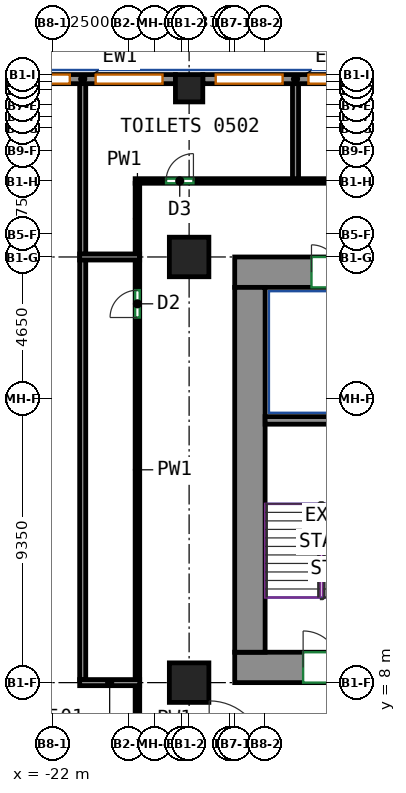
"""IFC4 building model, lengths in metres.
Left out: names, types, materials, properties, quantities, classifications, styles, units other than length and angle.
Written with IfcOpenShell. Run it as: python <this file> out.ifc"""

import sys

from ifc_helpers import new_model, si_unit, direction, frame, frame_2d, origin, origin_2d, place, context, subcontext, project, spatial, rectangle, extrude, source, transform, mapped, element, fill, save


model = new_model("IFC4")
c1 = context("Model", 3, precision=1e-05, world=origin(), true_north=direction((0.0, 1.0)))
c2 = subcontext(c1, "Body", "Model", "MODEL_VIEW")
j1 = project(units=[si_unit("LENGTHUNIT", "METRE"), si_unit("PLANEANGLEUNIT", "RADIAN")], contexts=[c1])
p1 = place(None, origin())
s1 = spatial("IfcSite", under=j1, at=p1, CompositionType="ELEMENT")
p2 = place(p1, origin())
s2 = spatial("IfcBuilding", under=s1, at=p2, CompositionType="ELEMENT")
p3 = place(p2, frame((0.0, 0.0, 27.0)))
s3 = spatial("IfcBuildingStorey", under=s2, at=p3, CompositionType="ELEMENT", Elevation=27.0)
m1 = source(origin(), c2, "Body", "SweptSolid", [
    extrude(rectangle(XDim=1.3, YDim=1.3, at=origin_2d()), origin(), (0.0, 0.0, 1.0), 3.72),
])
for number, where, z_axis, x_axis in (
    (1, (-17.5, 8.0, 0.0), (0.0, 0.0, 1.0), (1.0, 0.0, 0.0)),
    (2, (-17.5, 22.0, 0.0), (0.0, 0.0, 1.0), (1.0, 0.0, 0.0)),
):
    element("IfcColumn", number, at=place(p3, frame(where, z_axis=z_axis, x_axis=x_axis)), inside=s3, PredefinedType="COLUMN", context=c2, shape_type="MappedRepresentation", body=[
        mapped(m1, transform((0.0, 0.0, 0.0))),
    ])
m2 = source(origin(), c2, "Body", "SweptSolid", [
    extrude(rectangle(XDim=0.9, YDim=0.9, at=origin_2d()), origin(), (0.0, 0.0, 1.0), 3.72),
])
p4 = place(p3, frame((-17.5, 27.55, 0.0), z_axis=(0.0, 0.0, 1.0), x_axis=(1.0, 0.0, 0.0)))
e3 = element("IfcColumn", 3, at=p4, inside=s3, PredefinedType="COLUMN", context=c2, shape_type="MappedRepresentation", body=[
    mapped(m2, transform((0.0, 0.0, 0.0))),
])
m3 = source(origin(), c2, "Body", "SweptSolid", [
    extrude(rectangle(XDim=5.63, YDim=1.0, at=frame_2d((2.815, 0.0))), origin(), (0.0, 0.0, 1.0), 3.72),
])
p5 = place(p3, frame((-16.0, 8.5, 0.0), z_axis=(0.0, 0.0, 1.0), x_axis=(1.0, 0.0, 0.0)))
e4 = element("IfcWall", 4, at=p5, inside=s3, PredefinedType="SHEAR", context=c2, shape_type="MappedRepresentation", body=[
    mapped(m3, transform((0.0, 0.0, 0.0))),
])
p6 = place(p5, frame((2.25, 0.0, 0.0)))
e5 = element("IfcOpeningElement", 5, at=p6, cuts=e4, PredefinedType="OPENING", context=c2, shape_type="SweptSolid", body=[
    extrude(rectangle(XDim=1.2, YDim=2.1, at=frame_2d((0.6, 1.05))), frame((0.0, 0.51, 0.0), z_axis=(0.0, -1.0, 0.0), x_axis=(1.0, 0.0, 0.0)), (0.0, 0.0, 1.0), 1.02),
])
m4 = source(origin(), c2, "Body", "SweptSolid", [
    extrude(rectangle(XDim=34.1, YDim=1.0, at=frame_2d((17.05, 0.0))), origin(), (0.0, 0.0, 1.0), 3.72),
])
p7 = place(p3, frame((-16.0, 21.5, 0.0), z_axis=(0.0, 0.0, 1.0), x_axis=(1.0, 0.0, 0.0)))
e6 = element("IfcWall", 6, at=p7, inside=s3, PredefinedType="SHEAR", context=c2, shape_type="MappedRepresentation", body=[
    mapped(m4, transform((0.0, 0.0, 0.0))),
])
p8 = place(p7, frame((6.108, 0.0, 0.0)))
e7 = element("IfcOpeningElement", 7, at=p8, cuts=e6, PredefinedType="OPENING", context=c2, shape_type="SweptSolid", body=[
    extrude(rectangle(XDim=0.9, YDim=2.1, at=frame_2d((0.45, 1.05))), frame((0.0, 0.51, 0.0), z_axis=(0.0, -1.0, 0.0), x_axis=(1.0, 0.0, 0.0)), (0.0, 0.0, 1.0), 1.02),
])
p9 = place(p7, frame((11.173, 0.0, 0.0)))
e8 = element("IfcOpeningElement", 8, at=p9, cuts=e6, PredefinedType="OPENING", context=c2, shape_type="SweptSolid", body=[
    extrude(rectangle(XDim=0.9, YDim=2.1, at=frame_2d((0.45, 1.05))), frame((0.0, 0.51, 0.0), z_axis=(0.0, -1.0, 0.0), x_axis=(1.0, 0.0, 0.0)), (0.0, 0.0, 1.0), 1.02),
])
p10 = place(p7, frame((16.238, 0.0, 0.0)))
e9 = element("IfcOpeningElement", 9, at=p10, cuts=e6, PredefinedType="OPENING", context=c2, shape_type="SweptSolid", body=[
    extrude(rectangle(XDim=0.9, YDim=2.1, at=frame_2d((0.45, 1.05))), frame((0.0, 0.51, 0.0), z_axis=(0.0, -1.0, 0.0), x_axis=(1.0, 0.0, 0.0)), (0.0, 0.0, 1.0), 1.02),
])
p11 = place(p7, frame((21.062, 0.0, 0.0)))
e10 = element("IfcOpeningElement", 10, at=p11, cuts=e6, PredefinedType="OPENING", context=c2, shape_type="SweptSolid", body=[
    extrude(rectangle(XDim=0.9, YDim=2.1, at=frame_2d((0.45, 1.05))), frame((0.0, 0.51, 0.0), z_axis=(0.0, -1.0, 0.0), x_axis=(1.0, 0.0, 0.0)), (0.0, 0.0, 1.0), 1.02),
])
p12 = place(p7, frame((26.489, 0.0, 0.0)))
e11 = element("IfcOpeningElement", 11, at=p12, cuts=e6, PredefinedType="OPENING", context=c2, shape_type="SweptSolid", body=[
    extrude(rectangle(XDim=0.9, YDim=2.1, at=frame_2d((0.45, 1.05))), frame((0.0, 0.51, 0.0), z_axis=(0.0, -1.0, 0.0), x_axis=(1.0, 0.0, 0.0)), (0.0, 0.0, 1.0), 1.02),
])
p13 = place(p7, frame((2.525, 0.0, 0.0)))
e12 = element("IfcOpeningElement", 12, at=p13, cuts=e6, PredefinedType="OPENING", context=c2, shape_type="SweptSolid", body=[
    extrude(rectangle(XDim=0.9, YDim=2.1, at=frame_2d((0.45, 1.05))), frame((0.0, 0.51, 0.0), z_axis=(0.0, -1.0, 0.0), x_axis=(1.0, 0.0, 0.0)), (0.0, 0.0, 1.0), 1.02),
])
p14 = place(p7, frame((30.675, 0.0, 0.0)))
e13 = element("IfcOpeningElement", 13, at=p14, cuts=e6, PredefinedType="OPENING", context=c2, shape_type="SweptSolid", body=[
    extrude(rectangle(XDim=0.9, YDim=2.1, at=frame_2d((0.45, 1.05))), frame((0.0, 0.51, 0.0), z_axis=(0.0, -1.0, 0.0), x_axis=(1.0, 0.0, 0.0)), (0.0, 0.0, 1.0), 1.02),
])
m5 = source(origin(), c2, "Body", "SweptSolid", [
    extrude(rectangle(XDim=12.0, YDim=1.0, at=frame_2d((6.0, 0.0))), origin(), (0.0, 0.0, 1.0), 3.72),
])
p15 = place(p3, frame((-15.5, 9.0, 0.0), z_axis=(0.0, 0.0, 1.0), x_axis=(0.0, 1.0, 0.0)))
e14 = element("IfcWall", 14, at=p15, inside=s3, PredefinedType="SHEAR", context=c2, shape_type="MappedRepresentation", body=[
    mapped(m5, transform((0.0, 0.0, 0.0))),
])
m6 = source(origin(), c2, "Body", "SweptSolid", [
    extrude(rectangle(XDim=3.7, YDim=0.25, at=frame_2d((1.85, 0.0))), origin(), (0.0, 0.0, 1.0), 3.72),
])
p16 = place(p3, frame((-15.0, 16.625, 0.0), z_axis=(0.0, 0.0, 1.0), x_axis=(1.0, 0.0, 0.0)))
e15 = element("IfcWall", 15, at=p16, inside=s3, PredefinedType="SHEAR", context=c2, shape_type="MappedRepresentation", body=[
    mapped(m6, transform((0.0, 0.0, 0.0))),
])
m7 = source(origin(), c2, "Body", "SweptSolid", [
    extrude(rectangle(XDim=6.1, YDim=0.3, at=frame_2d((3.05, 0.0))), origin(), (0.0, 0.0, 1.0), 3.72),
])
p17 = place(p3, frame((-10.95, 27.85, 0.0), z_axis=(0.0, 0.0, 1.0), x_axis=(-1.0, 0.0, 0.0)))
e16 = element("IfcWall", 16, at=p17, inside=s3, PredefinedType="SOLIDWALL", context=c2, shape_type="MappedRepresentation", body=[
    mapped(m7, transform((0.0, 0.0, 0.0))),
])
p18 = place(p17, frame((0.425, 0.0, 0.7)))
e17 = element("IfcOpeningElement", 17, at=p18, cuts=e16, PredefinedType="OPENING", context=c2, shape_type="SweptSolid", body=[
    extrude(rectangle(XDim=2.2, YDim=2.25, at=frame_2d((1.1, 1.125))), frame((0.0, 0.16, 0.0), z_axis=(0.0, -1.0, 0.0), x_axis=(1.0, 0.0, 0.0)), (0.0, 0.0, 1.0), 0.32),
])
p19 = place(p17, frame((3.475, 0.0, 0.7)))
e18 = element("IfcOpeningElement", 18, at=p19, cuts=e16, PredefinedType="OPENING", context=c2, shape_type="SweptSolid", body=[
    extrude(rectangle(XDim=2.2, YDim=2.25, at=frame_2d((1.1, 1.125))), frame((0.0, 0.16, 0.0), z_axis=(0.0, -1.0, 0.0), x_axis=(1.0, 0.0, 0.0)), (0.0, 0.0, 1.0), 0.32),
])
p20 = place(p3, frame((-17.95, 27.85, 0.0), z_axis=(0.0, 0.0, 1.0), x_axis=(-1.0, 0.0, 0.0)))
e19 = element("IfcWall", 19, at=p20, inside=s3, PredefinedType="SOLIDWALL", context=c2, shape_type="MappedRepresentation", body=[
    mapped(m7, transform((0.0, 0.0, 0.0))),
])
p21 = place(p20, frame((0.425, 0.0, 0.7)))
e20 = element("IfcOpeningElement", 20, at=p21, cuts=e19, PredefinedType="OPENING", context=c2, shape_type="SweptSolid", body=[
    extrude(rectangle(XDim=2.2, YDim=2.25, at=frame_2d((1.1, 1.125))), frame((0.0, 0.16, 0.0), z_axis=(0.0, -1.0, 0.0), x_axis=(1.0, 0.0, 0.0)), (0.0, 0.0, 1.0), 0.32),
])
p22 = place(p20, frame((3.475, 0.0, 0.7)))
e21 = element("IfcOpeningElement", 21, at=p22, cuts=e19, PredefinedType="OPENING", context=c2, shape_type="SweptSolid", body=[
    extrude(rectangle(XDim=2.2, YDim=2.25, at=frame_2d((1.1, 1.125))), frame((0.0, 0.16, 0.0), z_axis=(0.0, -1.0, 0.0), x_axis=(1.0, 0.0, 0.0)), (0.0, 0.0, 1.0), 0.32),
])
p23 = place(p3, frame((-19.2, 5.675, 0.0), z_axis=(0.0, 0.0, 1.0), x_axis=(0.0, 1.0, 0.0)))
e22 = element("IfcWall", 22, at=p23, inside=s3, PredefinedType="PARTITIONING", context=c2, shape_type="SweptSolid", body=[
    extrude(rectangle(XDim=2.235, YDim=0.15, at=frame_2d((1.117, 0.0))), origin(), (0.0, 0.0, 1.0), 3.72),
])
p24 = place(p3, frame((-19.2, 22.09, 0.0), z_axis=(0.0, 0.0, 1.0), x_axis=(0.0, 1.0, 0.0)))
e23 = element("IfcWall", 23, at=p24, inside=s3, PredefinedType="PARTITIONING", context=c2, shape_type="SweptSolid", body=[
    extrude(rectangle(XDim=2.335, YDim=0.15, at=frame_2d((1.167, 0.0))), origin(), (0.0, 0.0, 1.0), 3.72),
])
p25 = place(p3, frame((-19.275, 24.5, 0.0), z_axis=(0.0, 0.0, 1.0), x_axis=(1.0, 0.0, 0.0)))
e24 = element("IfcWall", 24, at=p25, inside=s3, PredefinedType="PARTITIONING", context=c2, shape_type="SweptSolid", body=[
    extrude(rectangle(XDim=40.35, YDim=0.15, at=frame_2d((20.175, 0.0))), origin(), (0.0, 0.0, 1.0), 3.07),
])
p26 = place(p25, frame((1.017, 0.0, 0.0)))
e25 = element("IfcOpeningElement", 25, at=p26, cuts=e24, PredefinedType="OPENING", context=c2, shape_type="SweptSolid", body=[
    extrude(rectangle(XDim=0.9, YDim=2.1, at=frame_2d((0.45, 1.05))), frame((0.0, 0.085, 0.0), z_axis=(0.0, -1.0, 0.0), x_axis=(1.0, 0.0, 0.0)), (0.0, 0.0, 1.0), 0.17),
])
p27 = place(p25, frame((15.073, 0.0, 0.0)))
e26 = element("IfcOpeningElement", 26, at=p27, cuts=e24, PredefinedType="OPENING", context=c2, shape_type="SweptSolid", body=[
    extrude(rectangle(XDim=0.9, YDim=2.1, at=frame_2d((0.45, 1.05))), frame((0.0, 0.085, 0.0), z_axis=(0.0, -1.0, 0.0), x_axis=(1.0, 0.0, 0.0)), (0.0, 0.0, 1.0), 0.17),
])
p28 = place(p25, frame((32.791, 0.0, 0.0)))
e27 = element("IfcOpeningElement", 27, at=p28, cuts=e24, PredefinedType="OPENING", context=c2, shape_type="SweptSolid", body=[
    extrude(rectangle(XDim=1.0, YDim=2.1, at=frame_2d((0.5, 1.05))), frame((0.0, 0.085, 0.0), z_axis=(0.0, -1.0, 0.0), x_axis=(1.0, 0.0, 0.0)), (0.0, 0.0, 1.0), 0.17),
])
p29 = place(p3, frame((-19.2, 8.09, 0.0), z_axis=(0.0, 0.0, 1.0), x_axis=(0.0, 1.0, 0.0)))
e28 = element("IfcWall", 28, at=p29, inside=s3, PredefinedType="PARTITIONING", context=c2, shape_type="SweptSolid", body=[
    extrude(rectangle(XDim=13.82, YDim=0.15, at=frame_2d((6.91, 0.0))), origin(), (0.0, 0.0, 1.0), 3.72),
])
p30 = place(p29, frame((11.919, 0.0, 0.0)))
e29 = element("IfcOpeningElement", 29, at=p30, cuts=e28, PredefinedType="OPENING", context=c2, shape_type="SweptSolid", body=[
    extrude(rectangle(XDim=0.9, YDim=2.1, at=frame_2d((0.45, 1.05))), frame((0.0, 0.085, 0.0), z_axis=(0.0, -1.0, 0.0), x_axis=(1.0, 0.0, 0.0)), (0.0, 0.0, 1.0), 0.17),
])
p31 = place(p3, frame((-21.0, 22.09, 0.0), z_axis=(0.0, 0.0, 1.0), x_axis=(0.0, 1.0, 0.0)))
e30 = element("IfcWall", 30, at=p31, inside=s3, PredefinedType="PARTITIONING", context=c2, shape_type="SweptSolid", body=[
    extrude(rectangle(XDim=5.66, YDim=0.2, at=frame_2d((2.83, 0.0))), origin(), (0.0, 0.0, 1.0), 3.72),
])
p32 = place(p3, frame((-21.0, 8.1, 0.0), z_axis=(0.0, 0.0, 1.0), x_axis=(0.0, 1.0, 0.0)))
e31 = element("IfcWall", 31, at=p32, inside=s3, PredefinedType="PARTITIONING", context=c2, shape_type="SweptSolid", body=[
    extrude(rectangle(XDim=13.81, YDim=0.2, at=frame_2d((6.905, 0.0))), origin(), (0.0, 0.0, 1.0), 3.72),
])
p33 = place(p3, frame((-21.1, 8.0, 0.0), z_axis=(0.0, 0.0, 1.0), x_axis=(1.0, 0.0, 0.0)))
e32 = element("IfcWall", 32, at=p33, inside=s3, PredefinedType="PARTITIONING", context=c2, shape_type="SweptSolid", body=[
    extrude(rectangle(XDim=1.974, YDim=0.2, at=frame_2d((0.987, 0.0))), origin(), (0.0, 0.0, 1.0), 3.07),
])
p34 = place(p3, frame((-14.0, 24.576, 0.0), z_axis=(0.0, 0.0, 1.0), x_axis=(0.0, 1.0, 0.0)))
e33 = element("IfcWall", 33, at=p34, inside=s3, PredefinedType="PARTITIONING", context=c2, shape_type="SweptSolid", body=[
    extrude(rectangle(XDim=3.174, YDim=0.2, at=frame_2d((1.587, 0.0))), origin(), (0.0, 0.0, 1.0), 3.72),
])
p35 = place(p3, frame((-21.1, 22.0, 0.0), z_axis=(0.0, 0.0, 1.0), x_axis=(1.0, 0.0, 0.0)))
e34 = element("IfcWall", 34, at=p35, inside=s3, PredefinedType="PARTITIONING", context=c2, shape_type="SweptSolid", body=[
    extrude(rectangle(XDim=1.974, YDim=0.2, at=frame_2d((0.987, 0.0))), origin(), (0.0, 0.0, 1.0), 3.72),
])
p36 = place(p18, origin())
e35 = element("IfcWindow", 35, at=p36, inside=s3, PartitioningType="SINGLE_PANEL", PredefinedType="WINDOW", context=c2, shape_type="SweptSolid", body=[
    extrude(rectangle(XDim=2.2, YDim=2.25, at=frame_2d((1.1, 1.125))), frame((0.0, 0.03, 0.0), z_axis=(0.0, -1.0, 0.0), x_axis=(1.0, 0.0, 0.0)), (0.0, 0.0, 1.0), 0.06),
])
fill(e17, e35)
p37 = place(p19, origin())
e36 = element("IfcWindow", 36, at=p37, inside=s3, PartitioningType="SINGLE_PANEL", PredefinedType="WINDOW", context=c2, shape_type="SweptSolid", body=[
    extrude(rectangle(XDim=2.2, YDim=2.25, at=frame_2d((1.1, 1.125))), frame((0.0, 0.03, 0.0), z_axis=(0.0, -1.0, 0.0), x_axis=(1.0, 0.0, 0.0)), (0.0, 0.0, 1.0), 0.06),
])
fill(e18, e36)
p38 = place(p21, origin())
e37 = element("IfcWindow", 37, at=p38, inside=s3, PartitioningType="SINGLE_PANEL", PredefinedType="WINDOW", context=c2, shape_type="SweptSolid", body=[
    extrude(rectangle(XDim=2.2, YDim=2.25, at=frame_2d((1.1, 1.125))), frame((0.0, 0.03, 0.0), z_axis=(0.0, -1.0, 0.0), x_axis=(1.0, 0.0, 0.0)), (0.0, 0.0, 1.0), 0.06),
])
fill(e20, e37)
p39 = place(p22, origin())
e38 = element("IfcWindow", 38, at=p39, inside=s3, PartitioningType="SINGLE_PANEL", PredefinedType="WINDOW", context=c2, shape_type="SweptSolid", body=[
    extrude(rectangle(XDim=2.2, YDim=2.25, at=frame_2d((1.1, 1.125))), frame((0.0, 0.03, 0.0), z_axis=(0.0, -1.0, 0.0), x_axis=(1.0, 0.0, 0.0)), (0.0, 0.0, 1.0), 0.06),
])
fill(e21, e38)
p40 = place(p13, origin())
e39 = element("IfcDoor", 39, at=p40, inside=s3, OperationType="SINGLE_SWING_LEFT", PredefinedType="DOOR", context=c2, shape_type="SweptSolid", body=[
    extrude(rectangle(XDim=0.9, YDim=2.1, at=frame_2d((0.45, 1.05))), frame((0.0, -0.355, 0.0), z_axis=(0.0, -1.0, 0.0), x_axis=(1.0, 0.0, 0.0)), (0.0, 0.0, 1.0), 0.05),
])
fill(e12, e39)
p41 = place(p6, origin())
e40 = element("IfcDoor", 40, at=p41, inside=s3, OperationType="DOUBLE_DOOR_SINGLE_SWING", PredefinedType="DOOR", context=c2, shape_type="SweptSolid", body=[
    extrude(rectangle(XDim=1.2, YDim=2.1, at=frame_2d((0.6, 1.05))), frame((0.0, 0.405, 0.0), z_axis=(0.0, -1.0, 0.0), x_axis=(1.0, 0.0, 0.0)), (0.0, 0.0, 1.0), 0.05),
])
fill(e5, e40)
p42 = place(p30, origin())
e41 = element("IfcDoor", 41, at=p42, inside=s3, OperationType="SINGLE_SWING_LEFT", PredefinedType="DOOR", context=c2, shape_type="SweptSolid", body=[
    extrude(rectangle(XDim=0.9, YDim=2.1, at=frame_2d((0.45, 1.05))), frame((0.0, 0.025, 0.0), z_axis=(0.0, -1.0, 0.0), x_axis=(1.0, 0.0, 0.0)), (0.0, 0.0, 1.0), 0.05),
])
fill(e29, e41)
p43 = place(p26, origin())
e42 = element("IfcDoor", 42, at=p43, inside=s3, OperationType="SINGLE_SWING_RIGHT", PredefinedType="DOOR", context=c2, shape_type="SweptSolid", body=[
    extrude(rectangle(XDim=0.9, YDim=2.1, at=frame_2d((0.45, 1.05))), frame((0.0, 0.025, 0.0), z_axis=(0.0, -1.0, 0.0), x_axis=(1.0, 0.0, 0.0)), (0.0, 0.0, 1.0), 0.05),
])
fill(e25, e42)
save(model, sys.argv[1])
